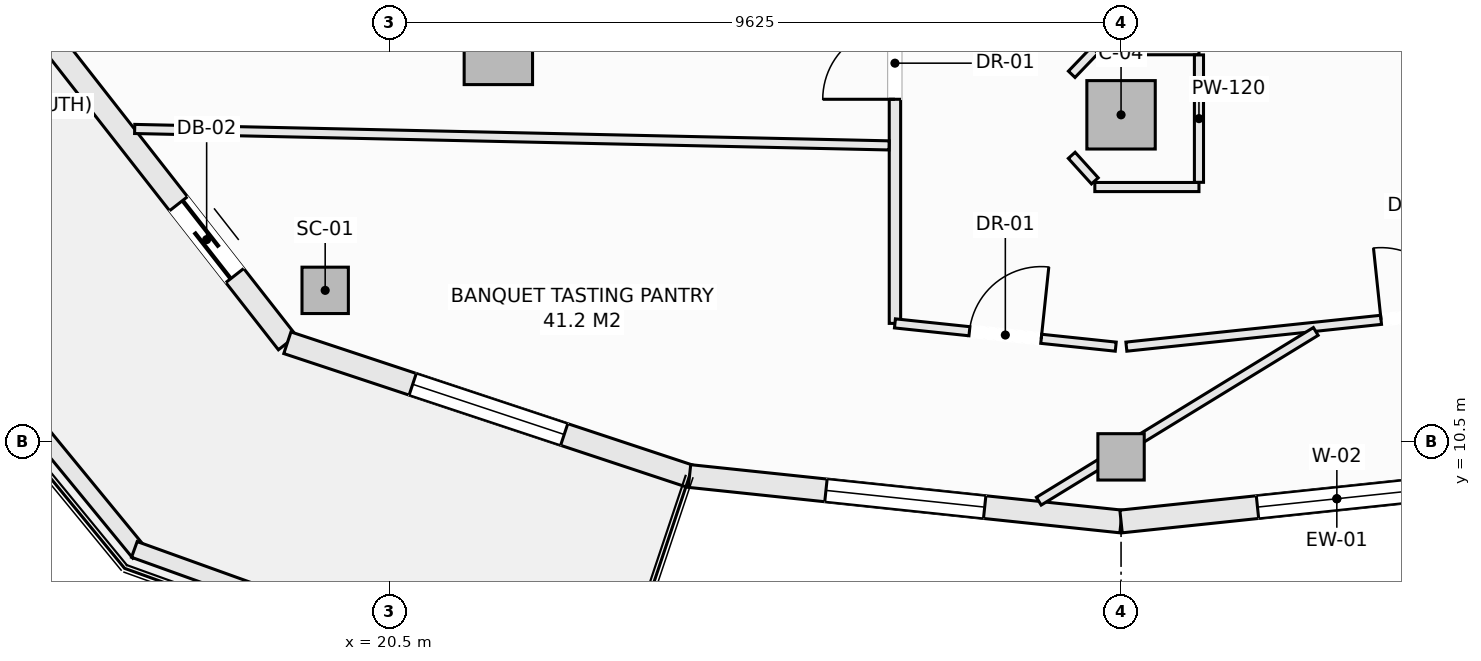
"""IFC4 building model, lengths in metres.
Left out: names, types, materials, properties, quantities, classifications, styles, units other than length and angle.
Written with IfcOpenShell. Run it as: python <this file> out.ifc"""

import sys

from ifc_helpers import new_model, si_unit, direction, frame, frame_2d, origin, origin_2d, place, context, subcontext, project, spatial, rectangle, hollow_rectangle, extrude, element, fill, save


model = new_model("IFC4")
c1 = context("Model", 3, precision=1e-05, world=origin(), true_north=direction((0.0, 1.0)))
c2 = subcontext(c1, "Body", "Model", "MODEL_VIEW")
j1 = project(units=[si_unit("LENGTHUNIT", "METRE"), si_unit("PLANEANGLEUNIT", "RADIAN")], contexts=[c1])
p1 = place(None, origin())
s1 = spatial("IfcSite", under=j1, at=p1, CompositionType="ELEMENT")
p2 = place(p1, origin())
s2 = spatial("IfcBuilding", under=s1, at=p2, CompositionType="ELEMENT")
p3 = place(p2, frame((0.0, 0.0, 146.1)))
s3 = spatial("IfcBuildingStorey", under=s2, at=p3, CompositionType="ELEMENT", Elevation=146.1)
for number, where, z_axis, x_axis in (
    (1, (19.654, 12.49, -0.27), (0.0, 0.0, 1.0), (1.0, 0.0, 0.0)),
    (2, (30.125, 10.3, -0.27), (0.0, 0.0, 1.0), (1.0, 0.0, 0.0)),
):
    element("IfcColumn", number, at=place(p3, frame(where, z_axis=z_axis, x_axis=x_axis)), inside=s3, PredefinedType="COLUMN", context=c2, shape_type="SweptSolid", body=[
        extrude(hollow_rectangle(XDim=0.61, YDim=0.61, WallThickness=0.025, at=origin_2d()), origin(), (0.0, 0.0, 1.0), 3.4),
    ])
for number, where, z_axis, x_axis in (
    (3, (21.932, 15.648, -0.27), (0.0, 0.0, 1.0), (1.0, 0.0, 0.0)),
    (4, (30.125, 14.8, -0.27), (0.0, 0.0, 1.0), (1.0, 0.0, 0.0)),
):
    element("IfcColumn", number, at=place(p3, frame(where, z_axis=z_axis, x_axis=x_axis)), inside=s3, PredefinedType="COLUMN", context=c2, shape_type="SweptSolid", body=[
        extrude(rectangle(XDim=0.9, YDim=0.9, at=origin_2d()), origin(), (0.0, 0.0, 1.0), 3.4),
    ])
p4 = place(p3, frame((15.937, 15.914, 0.0), z_axis=(0.0, 0.0, 1.0), x_axis=(0.616429245738, -0.787410302828, 0.0)))
e5 = element("IfcWall", 5, at=p4, inside=s3, PredefinedType="SOLIDWALL", context=c2, shape_type="SweptSolid", body=[
    extrude(rectangle(XDim=5.223, YDim=0.3, at=frame_2d((2.612, 0.0))), origin(), (0.0, 0.0, 1.0), 2.653),
])
p5 = place(p4, frame((2.9, 0.0, 0.0)))
e6 = element("IfcOpeningElement", 6, at=p5, cuts=e5, PredefinedType="OPENING", context=c2, shape_type="SweptSolid", body=[
    extrude(rectangle(XDim=1.2, YDim=2.2, at=frame_2d((0.6, 1.1))), frame((0.0, 0.16, 0.0), z_axis=(0.0, -1.0, 0.0), x_axis=(1.0, 0.0, 0.0)), (0.0, 0.0, 1.0), 0.32),
])
p6 = place(p3, frame((19.156, 11.801, 0.0), z_axis=(0.0, 0.0, 1.0), x_axis=(0.949246811547, -0.314532177636, 0.0)))
e7 = element("IfcWall", 7, at=p6, inside=s3, PredefinedType="SOLIDWALL", context=c2, shape_type="SweptSolid", body=[
    extrude(rectangle(XDim=5.574, YDim=0.3, at=frame_2d((2.787, 0.0))), origin(), (0.0, 0.0, 1.0), 2.653),
])
p7 = place(p6, frame((1.737, 0.0, 0.74)))
e8 = element("IfcOpeningElement", 8, at=p7, cuts=e7, PredefinedType="OPENING", context=c2, shape_type="SweptSolid", body=[
    extrude(rectangle(XDim=2.1, YDim=1.7, at=frame_2d((1.05, 0.85))), frame((0.0, 0.16, 0.0), z_axis=(0.0, -1.0, 0.0), x_axis=(1.0, 0.0, 0.0)), (0.0, 0.0, 1.0), 0.32),
])
p8 = place(p3, frame((24.447, 10.048, 0.0), z_axis=(0.0, 0.0, 1.0), x_axis=(0.994496545245, -0.104769372887, 0.0)))
e9 = element("IfcWall", 9, at=p8, inside=s3, PredefinedType="SOLIDWALL", context=c2, shape_type="SweptSolid", body=[
    extrude(rectangle(XDim=5.709, YDim=0.3, at=frame_2d((2.854, 0.0))), origin(), (0.0, 0.0, 1.0), 2.653),
])
p9 = place(p8, frame((1.805, 0.0, 0.74)))
e10 = element("IfcOpeningElement", 10, at=p9, cuts=e9, PredefinedType="OPENING", context=c2, shape_type="SweptSolid", body=[
    extrude(rectangle(XDim=2.1, YDim=1.7, at=frame_2d((1.05, 0.85))), frame((0.0, 0.16, 0.0), z_axis=(0.0, -1.0, 0.0), x_axis=(1.0, 0.0, 0.0)), (0.0, 0.0, 1.0), 0.32),
])
p10 = place(p3, frame((30.125, 9.45, 0.0), z_axis=(0.0, 0.0, 1.0), x_axis=(0.994496545245, 0.104769372887, 0.0)))
e11 = element("IfcWall", 11, at=p10, inside=s3, PredefinedType="SOLIDWALL", context=c2, shape_type="SweptSolid", body=[
    extrude(rectangle(XDim=5.709, YDim=0.3, at=frame_2d((2.854, 0.0))), origin(), (0.0, 0.0, 1.0), 2.653),
])
p11 = place(p10, frame((1.805, 0.0, 0.74)))
e12 = element("IfcOpeningElement", 12, at=p11, cuts=e11, PredefinedType="OPENING", context=c2, shape_type="SweptSolid", body=[
    extrude(rectangle(XDim=2.1, YDim=1.7, at=frame_2d((1.05, 0.85))), frame((0.0, 0.16, 0.0), z_axis=(0.0, -1.0, 0.0), x_axis=(1.0, 0.0, 0.0)), (0.0, 0.0, 1.0), 0.32),
])
p12 = place(p3, frame((13.246, 13.863, 0.0), z_axis=(0.0, 0.0, 1.0), x_axis=(0.634429234628, -0.77298094818, 0.0)))
e13 = element("IfcWall", 13, at=p12, inside=s3, PredefinedType="PARAPET", context=c2, shape_type="SweptSolid", body=[
    extrude(rectangle(XDim=6.245, YDim=0.22, at=frame_2d((3.123, 0.0))), origin(), (0.0, 0.0, 1.0), 0.52),
])
p13 = place(p3, frame((17.143, 9.082, 0.0), z_axis=(0.0, 0.0, 1.0), x_axis=(0.940948576924, -0.338549517184, 0.0)))
e14 = element("IfcWall", 14, at=p13, inside=s3, PredefinedType="PARAPET", context=c2, shape_type="SweptSolid", body=[
    extrude(rectangle(XDim=6.664, YDim=0.22, at=frame_2d((3.332, 0.0))), origin(), (0.0, 0.0, 1.0), 0.52),
])
p14 = place(p3, frame((27.15, 12.056, 0.0), z_axis=(0.0, 0.0, 1.0), x_axis=(0.0, 1.0, 0.0)))
e15 = element("IfcWall", 15, at=p14, inside=s3, PredefinedType="PARTITIONING", context=c2, shape_type="SweptSolid", body=[
    extrude(rectangle(XDim=4.917, YDim=0.15, at=frame_2d((2.458, 0.0))), origin(), (0.0, 0.0, 1.0), 3.13),
])
p15 = place(p14, frame((2.948, 0.0, 0.0)))
e16 = element("IfcOpeningElement", 16, at=p15, cuts=e15, PredefinedType="OPENING", context=c2, shape_type="SweptSolid", body=[
    extrude(rectangle(XDim=0.95, YDim=2.1, at=frame_2d((0.475, 1.05))), frame((0.0, 0.085, 0.0), z_axis=(0.0, -1.0, 0.0), x_axis=(1.0, 0.0, 0.0)), (0.0, 0.0, 1.0), 0.17),
])
p16 = place(p3, frame((29.78, 15.65, 0.0), z_axis=(0.0, 0.0, 1.0), x_axis=(1.0, 0.0, 0.0)))
e17 = element("IfcWall", 17, at=p16, inside=s3, PredefinedType="PARTITIONING", context=c2, shape_type="SweptSolid", body=[
    extrude(rectangle(XDim=1.37, YDim=0.12, at=frame_2d((0.685, 0.0))), origin(), (0.0, 0.0, 1.0), 3.13),
])
p17 = place(p3, frame((30.195, 11.75, 0.0), z_axis=(0.0, 0.0, 1.0), x_axis=(0.994502215954, 0.104715531139, 0.0)))
e18 = element("IfcWall", 18, at=p17, inside=s3, PredefinedType="PARTITIONING", context=c2, shape_type="SweptSolid", body=[
    extrude(rectangle(XDim=5.787, YDim=0.12, at=frame_2d((2.893, 0.0))), origin(), (0.0, 0.0, 1.0), 3.13),
])
p18 = place(p17, frame((3.369, 0.0, 0.0)))
e19 = element("IfcOpeningElement", 19, at=p18, cuts=e18, PredefinedType="OPENING", context=c2, shape_type="SweptSolid", body=[
    extrude(rectangle(XDim=0.95, YDim=2.1, at=frame_2d((0.475, 1.05))), frame((0.0, 0.07, 0.0), z_axis=(0.0, -1.0, 0.0), x_axis=(1.0, 0.0, 0.0)), (0.0, 0.0, 1.0), 0.14),
])
p19 = place(p3, frame((27.15, 12.056, 0.0), z_axis=(0.0, 0.0, 1.0), x_axis=(0.994501330468, -0.104723940422, 0.0)))
e20 = element("IfcWall", 20, at=p19, inside=s3, PredefinedType="PARTITIONING", context=c2, shape_type="SweptSolid", body=[
    extrude(rectangle(XDim=2.921, YDim=0.12, at=frame_2d((1.46, 0.0))), origin(), (0.0, 0.0, 1.0), 3.13),
])
p20 = place(p19, frame((0.986, 0.0, 0.0)))
e21 = element("IfcOpeningElement", 21, at=p20, cuts=e20, PredefinedType="OPENING", context=c2, shape_type="SweptSolid", body=[
    extrude(rectangle(XDim=0.95, YDim=2.1, at=frame_2d((0.475, 1.05))), frame((0.0, 0.07, 0.0), z_axis=(0.0, -1.0, 0.0), x_axis=(1.0, 0.0, 0.0)), (0.0, 0.0, 1.0), 0.14),
])
p21 = place(p3, frame((29.476, 15.333, 0.0), z_axis=(0.0, 0.0, 1.0), x_axis=(0.692219273951, 0.721687243043, 0.0)))
e22 = element("IfcWall", 22, at=p21, inside=s3, PredefinedType="PARTITIONING", context=c2, shape_type="SweptSolid", body=[
    extrude(rectangle(XDim=0.439, YDim=0.12, at=frame_2d((0.22, 0.0))), origin(), (0.0, 0.0, 1.0), 3.13),
])
p22 = place(p3, frame((29.476, 14.267, 0.0), z_axis=(0.0, 0.0, 1.0), x_axis=(0.670659392016, -0.741765448037, 0.0)))
e23 = element("IfcWall", 23, at=p22, inside=s3, PredefinedType="PARTITIONING", context=c2, shape_type="SweptSolid", body=[
    extrude(rectangle(XDim=0.453, YDim=0.12, at=frame_2d((0.227, 0.0))), origin(), (0.0, 0.0, 1.0), 3.13),
])
p23 = place(p3, frame((29.78, 13.85, 0.0), z_axis=(0.0, 0.0, 1.0), x_axis=(1.0, 0.0, 0.0)))
e24 = element("IfcWall", 24, at=p23, inside=s3, PredefinedType="PARTITIONING", context=c2, shape_type="SweptSolid", body=[
    extrude(rectangle(XDim=1.37, YDim=0.12, at=frame_2d((0.685, 0.0))), origin(), (0.0, 0.0, 1.0), 3.13),
])
p24 = place(p3, frame((31.15, 13.912, 0.0), z_axis=(0.0, 0.0, 1.0), x_axis=(0.0, 1.0, 0.0)))
e25 = element("IfcWall", 25, at=p24, inside=s3, PredefinedType="PARTITIONING", context=c2, shape_type="SweptSolid", body=[
    extrude(rectangle(XDim=1.676, YDim=0.12, at=frame_2d((0.838, 0.0))), origin(), (0.0, 0.0, 1.0), 3.13),
])
p25 = place(p3, frame((17.147, 14.614, 0.0), z_axis=(0.0, 0.0, 1.0), x_axis=(0.99976262581, -0.021787428337, 0.0)))
e26 = element("IfcWall", 26, at=p25, inside=s3, PredefinedType="PARTITIONING", context=c2, shape_type="SweptSolid", body=[
    extrude(rectangle(XDim=9.928, YDim=0.12, at=frame_2d((4.964, 0.0))), origin(), (0.0, 0.0, 1.0), 2.653),
])
p26 = place(p3, frame((29.043, 9.717, 0.0), z_axis=(0.0, 0.0, 1.0), x_axis=(0.85263162776, 0.522512494916, 0.0)))
e27 = element("IfcWall", 27, at=p26, inside=s3, PredefinedType="PARTITIONING", context=c2, shape_type="SweptSolid", body=[
    extrude(rectangle(XDim=4.274, YDim=0.12, at=frame_2d((2.137, 0.0))), origin(), (0.0, 0.0, 1.0), 2.653),
])
p27 = place(p5, frame((1.2, 0.0, 0.0), z_axis=(0.0, 0.0, 1.0), x_axis=(-1.0, 0.0, 0.0)))
e28 = element("IfcDoor", 28, at=p27, inside=s3, OperationType="SLIDING_TO_LEFT", PredefinedType="DOOR", context=c2, shape_type="SweptSolid", body=[
    extrude(rectangle(XDim=1.2, YDim=2.2, at=frame_2d((0.6, 1.1))), frame((0.0, 0.025, 0.0), z_axis=(0.0, -1.0, 0.0), x_axis=(1.0, 0.0, 0.0)), (0.0, 0.0, 1.0), 0.05),
])
fill(e6, e28)
p28 = place(p7, origin())
e29 = element("IfcWindow", 29, at=p28, inside=s3, PartitioningType="SINGLE_PANEL", PredefinedType="WINDOW", context=c2, shape_type="SweptSolid", body=[
    extrude(rectangle(XDim=2.1, YDim=1.7, at=frame_2d((1.05, 0.85))), frame((0.0, 0.03, 0.0), z_axis=(0.0, -1.0, 0.0), x_axis=(1.0, 0.0, 0.0)), (0.0, 0.0, 1.0), 0.06),
])
fill(e8, e29)
p29 = place(p9, origin())
e30 = element("IfcWindow", 30, at=p29, inside=s3, PartitioningType="SINGLE_PANEL", PredefinedType="WINDOW", context=c2, shape_type="SweptSolid", body=[
    extrude(rectangle(XDim=2.1, YDim=1.7, at=frame_2d((1.05, 0.85))), frame((0.0, 0.03, 0.0), z_axis=(0.0, -1.0, 0.0), x_axis=(1.0, 0.0, 0.0)), (0.0, 0.0, 1.0), 0.06),
])
fill(e10, e30)
p30 = place(p11, origin())
e31 = element("IfcWindow", 31, at=p30, inside=s3, PartitioningType="SINGLE_PANEL", PredefinedType="WINDOW", context=c2, shape_type="SweptSolid", body=[
    extrude(rectangle(XDim=2.1, YDim=1.7, at=frame_2d((1.05, 0.85))), frame((0.0, 0.03, 0.0), z_axis=(0.0, -1.0, 0.0), x_axis=(1.0, 0.0, 0.0)), (0.0, 0.0, 1.0), 0.06),
])
fill(e12, e31)
p31 = place(p15, origin())
e32 = element("IfcDoor", 32, at=p31, inside=s3, OperationType="SINGLE_SWING_LEFT", PredefinedType="DOOR", context=c2, shape_type="SweptSolid", body=[
    extrude(rectangle(XDim=0.95, YDim=2.1, at=frame_2d((0.475, 1.05))), frame((0.0, 0.025, 0.0), z_axis=(0.0, -1.0, 0.0), x_axis=(1.0, 0.0, 0.0)), (0.0, 0.0, 1.0), 0.05),
])
fill(e16, e32)
p32 = place(p20, origin())
e33 = element("IfcDoor", 33, at=p32, inside=s3, OperationType="SINGLE_SWING_RIGHT", PredefinedType="DOOR", context=c2, shape_type="SweptSolid", body=[
    extrude(rectangle(XDim=0.95, YDim=2.1, at=frame_2d((0.475, 1.05))), frame((0.0, 0.025, 0.0), z_axis=(0.0, -1.0, 0.0), x_axis=(1.0, 0.0, 0.0)), (0.0, 0.0, 1.0), 0.05),
])
fill(e21, e33)
p33 = place(p18, origin())
e34 = element("IfcDoor", 34, at=p33, inside=s3, OperationType="SINGLE_SWING_LEFT", PredefinedType="DOOR", context=c2, shape_type="SweptSolid", body=[
    extrude(rectangle(XDim=0.95, YDim=2.1, at=frame_2d((0.475, 1.05))), frame((0.0, 0.025, 0.0), z_axis=(0.0, -1.0, 0.0), x_axis=(1.0, 0.0, 0.0)), (0.0, 0.0, 1.0), 0.05),
])
fill(e19, e34)
save(model, sys.argv[1])
